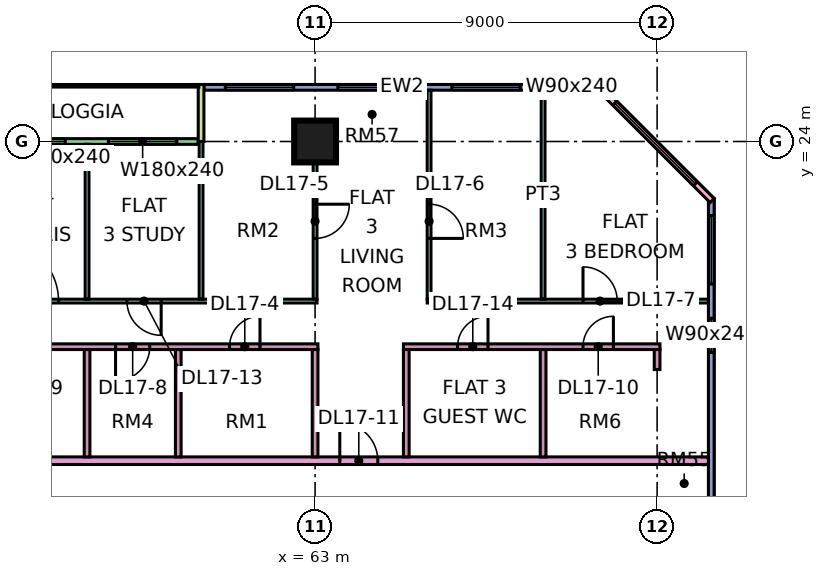
"""IFC4 building model, lengths in metres.
Left out: names, types, materials, properties, quantities, classifications, styles, units other than length and angle.
Written with IfcOpenShell. Run it as: python <this file> out.ifc"""

import sys

from ifc_helpers import new_model, si_unit, direction, frame, frame_2d, origin, origin_2d, place, context, subcontext, project, spatial, rectangle, extrude, element, fill, save


model = new_model("IFC4")
c1 = context("Model", 3, precision=1e-05, world=origin(), true_north=direction((0.0, 1.0)))
c2 = subcontext(c1, "Body", "Model", "MODEL_VIEW")
j1 = project(units=[si_unit("LENGTHUNIT", "METRE"), si_unit("PLANEANGLEUNIT", "RADIAN")], contexts=[c1])
p1 = place(None, origin())
s1 = spatial("IfcSite", under=j1, at=p1, CompositionType="ELEMENT")
p2 = place(p1, origin())
s2 = spatial("IfcBuilding", under=s1, at=p2, CompositionType="ELEMENT")
p3 = place(p2, frame((0.0, 0.0, 78.9)))
s3 = spatial("IfcBuildingStorey", under=s2, at=p3, CompositionType="ELEMENT", Elevation=78.9)
p4 = place(p3, frame((63.0, 24.0, 0.0), z_axis=(0.0, 0.0, 1.0), x_axis=(1.0, 0.0, 0.0)))
e1 = element("IfcColumn", 1, at=p4, inside=s3, PredefinedType="COLUMN", context=c2, shape_type="SweptSolid", body=[
    extrude(rectangle(XDim=1.1, YDim=1.1, at=origin_2d()), origin(), (0.0, 0.0, 1.0), 3.75),
])
p5 = place(p3, frame((70.5, 25.425, 0.0), z_axis=(0.0, 0.0, 1.0), x_axis=(-1.0, 0.0, 0.0)))
e2 = element("IfcWall", 2, at=p5, inside=s3, PredefinedType="SOLIDWALL", context=c2, shape_type="SweptSolid", body=[
    extrude(rectangle(XDim=10.425, YDim=0.15, at=frame_2d((5.212, 0.0))), origin(), (0.0, 0.0, 1.0), 3.35),
])
p6 = place(p5, frame((0.3, 0.0, 0.45)))
e3 = element("IfcOpeningElement", 3, at=p6, cuts=e2, PredefinedType="OPENING", context=c2, shape_type="SweptSolid", body=[
    extrude(rectangle(XDim=0.9, YDim=2.4, at=frame_2d((0.45, 1.2))), frame((0.0, 0.085, 0.0), z_axis=(0.0, -1.0, 0.0), x_axis=(1.0, 0.0, 0.0)), (0.0, 0.0, 1.0), 0.17),
])
p7 = place(p5, frame((2.1, 0.0, 0.45)))
e4 = element("IfcOpeningElement", 4, at=p7, cuts=e2, PredefinedType="OPENING", context=c2, shape_type="SweptSolid", body=[
    extrude(rectangle(XDim=1.8, YDim=2.4, at=frame_2d((0.9, 1.2))), frame((0.0, 0.085, 0.0), z_axis=(0.0, -1.0, 0.0), x_axis=(1.0, 0.0, 0.0)), (0.0, 0.0, 1.0), 0.17),
])
p8 = place(p5, frame((5.1, 0.0, 0.45)))
e5 = element("IfcOpeningElement", 5, at=p8, cuts=e2, PredefinedType="OPENING", context=c2, shape_type="SweptSolid", body=[
    extrude(rectangle(XDim=1.8, YDim=2.4, at=frame_2d((0.9, 1.2))), frame((0.0, 0.085, 0.0), z_axis=(0.0, -1.0, 0.0), x_axis=(1.0, 0.0, 0.0)), (0.0, 0.0, 1.0), 0.17),
])
p9 = place(p5, frame((8.062, 0.0, 0.45)))
e6 = element("IfcOpeningElement", 6, at=p9, cuts=e2, PredefinedType="OPENING", context=c2, shape_type="SweptSolid", body=[
    extrude(rectangle(XDim=1.8, YDim=2.4, at=frame_2d((0.9, 1.2))), frame((0.0, 0.085, 0.0), z_axis=(0.0, -1.0, 0.0), x_axis=(1.0, 0.0, 0.0)), (0.0, 0.0, 1.0), 0.17),
])
p10 = place(p3, frame((59.925, 24.0, 0.0), z_axis=(0.0, 0.0, 1.0), x_axis=(-1.0, 0.0, 0.0)))
e7 = element("IfcWall", 7, at=p10, inside=s3, PredefinedType="SOLIDWALL", context=c2, shape_type="SweptSolid", body=[
    extrude(rectangle(XDim=11.85, YDim=0.15, at=frame_2d((5.925, 0.0))), origin(), (0.0, 0.0, 1.0), 3.35),
])
p11 = place(p10, frame((0.562, 0.0, 0.45)))
e8 = element("IfcOpeningElement", 8, at=p11, cuts=e7, PredefinedType="OPENING", context=c2, shape_type="SweptSolid", body=[
    extrude(rectangle(XDim=1.8, YDim=2.4, at=frame_2d((0.9, 1.2))), frame((0.0, 0.085, 0.0), z_axis=(0.0, -1.0, 0.0), x_axis=(1.0, 0.0, 0.0)), (0.0, 0.0, 1.0), 0.17),
])
p12 = place(p10, frame((3.5, 0.0, 0.45)))
e9 = element("IfcOpeningElement", 9, at=p12, cuts=e7, PredefinedType="OPENING", context=c2, shape_type="SweptSolid", body=[
    extrude(rectangle(XDim=1.2, YDim=2.4, at=frame_2d((0.6, 1.2))), frame((0.0, 0.085, 0.0), z_axis=(0.0, -1.0, 0.0), x_axis=(1.0, 0.0, 0.0)), (0.0, 0.0, 1.0), 0.17),
])
p13 = place(p10, frame((7.113, 0.0, 0.45)))
e10 = element("IfcOpeningElement", 10, at=p13, cuts=e7, PredefinedType="OPENING", context=c2, shape_type="SweptSolid", body=[
    extrude(rectangle(XDim=4.2, YDim=2.4, at=frame_2d((2.1, 1.2))), frame((0.0, 0.085, 0.0), z_axis=(0.0, -1.0, 0.0), x_axis=(1.0, 0.0, 0.0)), (0.0, 0.0, 1.0), 0.17),
])
p14 = place(p3, frame((60.0, 25.5, 0.0), z_axis=(0.0, 0.0, 1.0), x_axis=(0.0, -1.0, 0.0)))
e11 = element("IfcWall", 11, at=p14, inside=s3, PredefinedType="SOLIDWALL", context=c2, shape_type="SweptSolid", body=[
    extrude(rectangle(XDim=1.5, YDim=0.15, at=frame_2d((0.75, 0.0))), origin(), (0.0, 0.0, 1.0), 3.35),
])
p15 = place(p3, frame((73.425, 12.075, 0.0), z_axis=(0.0, 0.0, 1.0), x_axis=(0.0, 1.0, 0.0)))
e12 = element("IfcWall", 12, at=p15, inside=s3, PredefinedType="SOLIDWALL", context=c2, shape_type="SweptSolid", body=[
    extrude(rectangle(XDim=10.425, YDim=0.15, at=frame_2d((5.212, 0.0))), origin(), (0.0, 0.0, 1.0), 3.35),
])
p16 = place(p15, frame((6.375, 0.0, 0.45)))
e13 = element("IfcOpeningElement", 13, at=p16, cuts=e12, PredefinedType="OPENING", context=c2, shape_type="SweptSolid", body=[
    extrude(rectangle(XDim=0.9, YDim=2.4, at=frame_2d((0.45, 1.2))), frame((0.0, 0.085, 0.0), z_axis=(0.0, -1.0, 0.0), x_axis=(1.0, 0.0, 0.0)), (0.0, 0.0, 1.0), 0.17),
])
p17 = place(p15, frame((8.175, 0.0, 0.45)))
e14 = element("IfcOpeningElement", 14, at=p17, cuts=e12, PredefinedType="OPENING", context=c2, shape_type="SweptSolid", body=[
    extrude(rectangle(XDim=1.8, YDim=2.4, at=frame_2d((0.9, 1.2))), frame((0.0, 0.085, 0.0), z_axis=(0.0, -1.0, 0.0), x_axis=(1.0, 0.0, 0.0)), (0.0, 0.0, 1.0), 0.17),
])
p18 = place(p3, frame((73.447, 22.447, 0.0), z_axis=(0.0, 0.0, 1.0), x_axis=(-0.707106781187, 0.707106781187, 0.0)))
e15 = element("IfcWall", 15, at=p18, inside=s3, PredefinedType="SOLIDWALL", context=c2, shape_type="SweptSolid", body=[
    extrude(rectangle(XDim=4.243, YDim=0.15, at=frame_2d((2.121, 0.0))), origin(), (0.0, 0.0, 1.0), 3.35),
])
p19 = place(p18, frame((0.621, 0.0, 0.45)))
e16 = element("IfcOpeningElement", 16, at=p19, cuts=e15, PredefinedType="OPENING", context=c2, shape_type="SweptSolid", body=[
    extrude(rectangle(XDim=3.0, YDim=2.4, at=frame_2d((1.5, 1.2))), frame((0.0, 0.085, 0.0), z_axis=(0.0, -1.0, 0.0), x_axis=(1.0, 0.0, 0.0)), (0.0, 0.0, 1.0), 0.17),
])
p20 = place(p3, frame((51.225, 15.6, 0.0), z_axis=(0.0, 0.0, 1.0), x_axis=(1.0, 0.0, 0.0)))
e17 = element("IfcWall", 17, at=p20, inside=s3, PredefinedType="PARTITIONING", context=c2, shape_type="SweptSolid", body=[
    extrude(rectangle(XDim=22.125, YDim=0.2, at=frame_2d((11.062, 0.0))), origin(), (0.0, 0.0, 1.0), 3.35),
])
p21 = place(p20, frame((12.425, 0.0, 0.0)))
e18 = element("IfcOpeningElement", 18, at=p21, cuts=e17, PredefinedType="OPENING", context=c2, shape_type="SweptSolid", body=[
    extrude(rectangle(XDim=1.0, YDim=2.1, at=frame_2d((0.5, 1.05))), frame((0.0, 0.11, 0.0), z_axis=(0.0, -1.0, 0.0), x_axis=(1.0, 0.0, 0.0)), (0.0, 0.0, 1.0), 0.22),
])
p22 = place(p20, frame((0.875, 0.0, 0.0)))
e19 = element("IfcOpeningElement", 19, at=p22, cuts=e17, PredefinedType="OPENING", context=c2, shape_type="SweptSolid", body=[
    extrude(rectangle(XDim=1.0, YDim=2.1, at=frame_2d((0.5, 1.05))), frame((0.0, 0.11, 0.0), z_axis=(0.0, -1.0, 0.0), x_axis=(1.0, 0.0, 0.0)), (0.0, 0.0, 1.0), 0.22),
])
p23 = place(p3, frame((54.1, 18.6, 0.0), z_axis=(0.0, 0.0, 1.0), x_axis=(1.0, 0.0, 0.0)))
e20 = element("IfcWall", 20, at=p23, inside=s3, PredefinedType="PARTITIONING", context=c2, shape_type="SweptSolid", body=[
    extrude(rectangle(XDim=8.975, YDim=0.15, at=frame_2d((4.487, 0.0))), origin(), (0.0, 0.0, 1.0), 3.35),
])
p24 = place(p23, frame((6.65, 0.0, 0.0)))
e21 = element("IfcOpeningElement", 21, at=p24, cuts=e20, PredefinedType="OPENING", context=c2, shape_type="SweptSolid", body=[
    extrude(rectangle(XDim=0.8, YDim=2.1, at=frame_2d((0.4, 1.05))), frame((0.0, 0.085, 0.0), z_axis=(0.0, -1.0, 0.0), x_axis=(1.0, 0.0, 0.0)), (0.0, 0.0, 1.0), 0.17),
])
p25 = place(p23, frame((3.65, 0.0, 0.0)))
e22 = element("IfcOpeningElement", 22, at=p25, cuts=e20, PredefinedType="OPENING", context=c2, shape_type="SweptSolid", body=[
    extrude(rectangle(XDim=0.9, YDim=2.1, at=frame_2d((0.45, 1.05))), frame((0.0, 0.085, 0.0), z_axis=(0.0, -1.0, 0.0), x_axis=(1.0, 0.0, 0.0)), (0.0, 0.0, 1.0), 0.17),
])
p26 = place(p23, frame((0.95, 0.0, 0.0)))
e23 = element("IfcOpeningElement", 23, at=p26, cuts=e20, PredefinedType="OPENING", context=c2, shape_type="SweptSolid", body=[
    extrude(rectangle(XDim=0.8, YDim=2.1, at=frame_2d((0.4, 1.05))), frame((0.0, 0.085, 0.0), z_axis=(0.0, -1.0, 0.0), x_axis=(1.0, 0.0, 0.0)), (0.0, 0.0, 1.0), 0.17),
])
p27 = place(p3, frame((54.1, 19.8, 0.0), z_axis=(0.0, 0.0, 1.0), x_axis=(1.0, 0.0, 0.0)))
e24 = element("IfcWall", 24, at=p27, inside=s3, PredefinedType="PARTITIONING", context=c2, shape_type="SweptSolid", body=[
    extrude(rectangle(XDim=8.95, YDim=0.1, at=frame_2d((4.475, 0.0))), origin(), (0.0, 0.0, 1.0), 3.35),
])
p28 = place(p27, frame((0.55, 0.0, 0.0)))
e25 = element("IfcOpeningElement", 25, at=p28, cuts=e24, PredefinedType="OPENING", context=c2, shape_type="SweptSolid", body=[
    extrude(rectangle(XDim=1.6, YDim=2.1, at=frame_2d((0.8, 1.05))), frame((0.0, 0.06, 0.0), z_axis=(0.0, -1.0, 0.0), x_axis=(1.0, 0.0, 0.0)), (0.0, 0.0, 1.0), 0.12),
])
p29 = place(p27, frame((3.95, 0.0, 0.0)))
e26 = element("IfcOpeningElement", 26, at=p29, cuts=e24, PredefinedType="OPENING", context=c2, shape_type="SweptSolid", body=[
    extrude(rectangle(XDim=0.9, YDim=2.1, at=frame_2d((0.45, 1.05))), frame((0.0, 0.06, 0.0), z_axis=(0.0, -1.0, 0.0), x_axis=(1.0, 0.0, 0.0)), (0.0, 0.0, 1.0), 0.12),
])
p30 = place(p3, frame((57.0, 15.7, 0.0), z_axis=(0.0, 0.0, 1.0), x_axis=(0.0, 1.0, 0.0)))
e27 = element("IfcWall", 27, at=p30, inside=s3, PredefinedType="PARTITIONING", context=c2, shape_type="SweptSolid", body=[
    extrude(rectangle(XDim=2.825, YDim=0.15, at=frame_2d((1.413, 0.0))), origin(), (0.0, 0.0, 1.0), 3.35),
])
p31 = place(p3, frame((57.0, 19.85, 0.0), z_axis=(0.0, 0.0, 1.0), x_axis=(0.0, 1.0, 0.0)))
e28 = element("IfcWall", 28, at=p31, inside=s3, PredefinedType="PARTITIONING", context=c2, shape_type="SweptSolid", body=[
    extrude(rectangle(XDim=4.076, YDim=0.1, at=frame_2d((2.038, 0.0))), origin(), (0.0, 0.0, 1.0), 3.35),
])
p32 = place(p3, frame((59.4, 15.7, 0.0), z_axis=(0.0, 0.0, 1.0), x_axis=(0.0, 1.0, 0.0)))
e29 = element("IfcWall", 29, at=p32, inside=s3, PredefinedType="PARTITIONING", context=c2, shape_type="SweptSolid", body=[
    extrude(rectangle(XDim=2.825, YDim=0.15, at=frame_2d((1.413, 0.0))), origin(), (0.0, 0.0, 1.0), 3.35),
])
p33 = place(p3, frame((60.0, 19.85, 0.0), z_axis=(0.0, 0.0, 1.0), x_axis=(0.0, 1.0, 0.0)))
e30 = element("IfcWall", 30, at=p33, inside=s3, PredefinedType="PARTITIONING", context=c2, shape_type="SweptSolid", body=[
    extrude(rectangle(XDim=4.15, YDim=0.1, at=frame_2d((2.075, 0.0))), origin(), (0.0, 0.0, 1.0), 3.35),
])
p34 = place(p3, frame((63.0, 15.7, 0.0), z_axis=(0.0, 0.0, 1.0), x_axis=(0.0, 1.0, 0.0)))
e31 = element("IfcWall", 31, at=p34, inside=s3, PredefinedType="PARTITIONING", context=c2, shape_type="SweptSolid", body=[
    extrude(rectangle(XDim=2.825, YDim=0.15, at=frame_2d((1.413, 0.0))), origin(), (0.0, 0.0, 1.0), 3.35),
])
p35 = place(p3, frame((63.0, 19.85, 0.0), z_axis=(0.0, 0.0, 1.0), x_axis=(0.0, 1.0, 0.0)))
e32 = element("IfcWall", 32, at=p35, inside=s3, PredefinedType="PARTITIONING", context=c2, shape_type="SweptSolid", body=[
    extrude(rectangle(XDim=4.15, YDim=0.1, at=frame_2d((2.075, 0.0))), origin(), (0.0, 0.0, 1.0), 3.35),
])
p36 = place(p35, frame((1.6, 0.0, 0.0)))
e33 = element("IfcOpeningElement", 33, at=p36, cuts=e32, PredefinedType="OPENING", context=c2, shape_type="SweptSolid", body=[
    extrude(rectangle(XDim=0.9, YDim=2.1, at=frame_2d((0.45, 1.05))), frame((0.0, 0.06, 0.0), z_axis=(0.0, -1.0, 0.0), x_axis=(1.0, 0.0, 0.0)), (0.0, 0.0, 1.0), 0.12),
])
p37 = place(p3, frame((65.325, 18.6, 0.0), z_axis=(0.0, 0.0, 1.0), x_axis=(1.0, 0.0, 0.0)))
e34 = element("IfcWall", 34, at=p37, inside=s3, PredefinedType="PARTITIONING", context=c2, shape_type="SweptSolid", body=[
    extrude(rectangle(XDim=6.75, YDim=0.15, at=frame_2d((3.375, 0.0))), origin(), (0.0, 0.0, 1.0), 3.35),
])
p38 = place(p37, frame((4.725, 0.0, 0.0)))
e35 = element("IfcOpeningElement", 35, at=p38, cuts=e34, PredefinedType="OPENING", context=c2, shape_type="SweptSolid", body=[
    extrude(rectangle(XDim=0.8, YDim=2.1, at=frame_2d((0.4, 1.05))), frame((0.0, 0.085, 0.0), z_axis=(0.0, -1.0, 0.0), x_axis=(1.0, 0.0, 0.0)), (0.0, 0.0, 1.0), 0.17),
])
p39 = place(p37, frame((1.425, 0.0, 0.0)))
e36 = element("IfcOpeningElement", 36, at=p39, cuts=e34, PredefinedType="OPENING", context=c2, shape_type="SweptSolid", body=[
    extrude(rectangle(XDim=0.8, YDim=2.1, at=frame_2d((0.4, 1.05))), frame((0.0, 0.085, 0.0), z_axis=(0.0, -1.0, 0.0), x_axis=(1.0, 0.0, 0.0)), (0.0, 0.0, 1.0), 0.17),
])
p40 = place(p3, frame((65.4, 15.7, 0.0), z_axis=(0.0, 0.0, 1.0), x_axis=(0.0, 1.0, 0.0)))
e37 = element("IfcWall", 37, at=p40, inside=s3, PredefinedType="PARTITIONING", context=c2, shape_type="SweptSolid", body=[
    extrude(rectangle(XDim=2.825, YDim=0.15, at=frame_2d((1.413, 0.0))), origin(), (0.0, 0.0, 1.0), 3.35),
])
p41 = place(p3, frame((65.95, 19.8, 0.0), z_axis=(0.0, 0.0, 1.0), x_axis=(1.0, 0.0, 0.0)))
e38 = element("IfcWall", 38, at=p41, inside=s3, PredefinedType="PARTITIONING", context=c2, shape_type="SweptSolid", body=[
    extrude(rectangle(XDim=7.401, YDim=0.1, at=frame_2d((3.701, 0.0))), origin(), (0.0, 0.0, 1.0), 3.35),
])
p42 = place(p41, frame((4.1, 0.0, 0.0)))
e39 = element("IfcOpeningElement", 39, at=p42, cuts=e38, PredefinedType="OPENING", context=c2, shape_type="SweptSolid", body=[
    extrude(rectangle(XDim=0.9, YDim=2.1, at=frame_2d((0.45, 1.05))), frame((0.0, 0.06, 0.0), z_axis=(0.0, -1.0, 0.0), x_axis=(1.0, 0.0, 0.0)), (0.0, 0.0, 1.0), 0.12),
])
p43 = place(p3, frame((66.0, 19.85, 0.0), z_axis=(0.0, 0.0, 1.0), x_axis=(0.0, 1.0, 0.0)))
e40 = element("IfcWall", 40, at=p43, inside=s3, PredefinedType="PARTITIONING", context=c2, shape_type="SweptSolid", body=[
    extrude(rectangle(XDim=5.5, YDim=0.1, at=frame_2d((2.75, 0.0))), origin(), (0.0, 0.0, 1.0), 3.35),
])
p44 = place(p43, frame((1.6, 0.0, 0.0)))
e41 = element("IfcOpeningElement", 41, at=p44, cuts=e40, PredefinedType="OPENING", context=c2, shape_type="SweptSolid", body=[
    extrude(rectangle(XDim=0.9, YDim=2.1, at=frame_2d((0.45, 1.05))), frame((0.0, 0.06, 0.0), z_axis=(0.0, -1.0, 0.0), x_axis=(1.0, 0.0, 0.0)), (0.0, 0.0, 1.0), 0.12),
])
p45 = place(p3, frame((69.0, 15.7, 0.0), z_axis=(0.0, 0.0, 1.0), x_axis=(0.0, 1.0, 0.0)))
e42 = element("IfcWall", 42, at=p45, inside=s3, PredefinedType="PARTITIONING", context=c2, shape_type="SweptSolid", body=[
    extrude(rectangle(XDim=2.825, YDim=0.15, at=frame_2d((1.413, 0.0))), origin(), (0.0, 0.0, 1.0), 3.35),
])
p46 = place(p3, frame((69.0, 19.85, 0.0), z_axis=(0.0, 0.0, 1.0), x_axis=(0.0, 1.0, 0.0)))
e43 = element("IfcWall", 43, at=p46, inside=s3, PredefinedType="PARTITIONING", context=c2, shape_type="SweptSolid", body=[
    extrude(rectangle(XDim=5.501, YDim=0.1, at=frame_2d((2.75, 0.0))), origin(), (0.0, 0.0, 1.0), 3.35),
])
p47 = place(p3, frame((72.0, 18.0, 0.0), z_axis=(0.0, 0.0, 1.0), x_axis=(0.0, 1.0, 0.0)))
e44 = element("IfcWall", 44, at=p47, inside=s3, PredefinedType="PARTITIONING", context=c2, shape_type="SweptSolid", body=[
    extrude(rectangle(XDim=0.525, YDim=0.15, at=frame_2d((0.262, 0.0))), origin(), (0.0, 0.0, 1.0), 3.35),
])
p48 = place(p6, origin())
e45 = element("IfcWindow", 45, at=p48, inside=s3, PartitioningType="SINGLE_PANEL", PredefinedType="WINDOW", context=c2, shape_type="SweptSolid", body=[
    extrude(rectangle(XDim=0.9, YDim=2.4, at=frame_2d((0.45, 1.2))), frame((0.0, 0.03, 0.0), z_axis=(0.0, -1.0, 0.0), x_axis=(1.0, 0.0, 0.0)), (0.0, 0.0, 1.0), 0.06),
])
fill(e3, e45)
p49 = place(p7, origin())
e46 = element("IfcWindow", 46, at=p49, inside=s3, PartitioningType="SINGLE_PANEL", PredefinedType="WINDOW", context=c2, shape_type="SweptSolid", body=[
    extrude(rectangle(XDim=1.8, YDim=2.4, at=frame_2d((0.9, 1.2))), frame((0.0, 0.03, 0.0), z_axis=(0.0, -1.0, 0.0), x_axis=(1.0, 0.0, 0.0)), (0.0, 0.0, 1.0), 0.06),
])
fill(e4, e46)
p50 = place(p8, origin())
e47 = element("IfcWindow", 47, at=p50, inside=s3, PartitioningType="SINGLE_PANEL", PredefinedType="WINDOW", context=c2, shape_type="SweptSolid", body=[
    extrude(rectangle(XDim=1.8, YDim=2.4, at=frame_2d((0.9, 1.2))), frame((0.0, 0.03, 0.0), z_axis=(0.0, -1.0, 0.0), x_axis=(1.0, 0.0, 0.0)), (0.0, 0.0, 1.0), 0.06),
])
fill(e5, e47)
p51 = place(p9, origin())
e48 = element("IfcWindow", 48, at=p51, inside=s3, PartitioningType="SINGLE_PANEL", PredefinedType="WINDOW", context=c2, shape_type="SweptSolid", body=[
    extrude(rectangle(XDim=1.8, YDim=2.4, at=frame_2d((0.9, 1.2))), frame((0.0, 0.03, 0.0), z_axis=(0.0, -1.0, 0.0), x_axis=(1.0, 0.0, 0.0)), (0.0, 0.0, 1.0), 0.06),
])
fill(e6, e48)
p52 = place(p11, origin())
e49 = element("IfcWindow", 49, at=p52, inside=s3, PartitioningType="SINGLE_PANEL", PredefinedType="WINDOW", context=c2, shape_type="SweptSolid", body=[
    extrude(rectangle(XDim=1.8, YDim=2.4, at=frame_2d((0.9, 1.2))), frame((0.0, 0.03, 0.0), z_axis=(0.0, -1.0, 0.0), x_axis=(1.0, 0.0, 0.0)), (0.0, 0.0, 1.0), 0.06),
])
fill(e8, e49)
p53 = place(p12, origin())
e50 = element("IfcWindow", 50, at=p53, inside=s3, PartitioningType="SINGLE_PANEL", PredefinedType="WINDOW", context=c2, shape_type="SweptSolid", body=[
    extrude(rectangle(XDim=1.2, YDim=2.4, at=frame_2d((0.6, 1.2))), frame((0.0, 0.03, 0.0), z_axis=(0.0, -1.0, 0.0), x_axis=(1.0, 0.0, 0.0)), (0.0, 0.0, 1.0), 0.06),
])
fill(e9, e50)
p54 = place(p16, origin())
e51 = element("IfcWindow", 51, at=p54, inside=s3, PartitioningType="SINGLE_PANEL", PredefinedType="WINDOW", context=c2, shape_type="SweptSolid", body=[
    extrude(rectangle(XDim=0.9, YDim=2.4, at=frame_2d((0.45, 1.2))), frame((0.0, 0.03, 0.0), z_axis=(0.0, -1.0, 0.0), x_axis=(1.0, 0.0, 0.0)), (0.0, 0.0, 1.0), 0.06),
])
fill(e13, e51)
p55 = place(p17, origin())
e52 = element("IfcWindow", 52, at=p55, inside=s3, PartitioningType="SINGLE_PANEL", PredefinedType="WINDOW", context=c2, shape_type="SweptSolid", body=[
    extrude(rectangle(XDim=1.8, YDim=2.4, at=frame_2d((0.9, 1.2))), frame((0.0, 0.03, 0.0), z_axis=(0.0, -1.0, 0.0), x_axis=(1.0, 0.0, 0.0)), (0.0, 0.0, 1.0), 0.06),
])
fill(e14, e52)
p56 = place(p19, origin())
e53 = element("IfcWindow", 53, at=p56, inside=s3, PartitioningType="SINGLE_PANEL", PredefinedType="WINDOW", context=c2, shape_type="SweptSolid", body=[
    extrude(rectangle(XDim=3.0, YDim=2.4, at=frame_2d((1.5, 1.2))), frame((0.0, 0.03, 0.0), z_axis=(0.0, -1.0, 0.0), x_axis=(1.0, 0.0, 0.0)), (0.0, 0.0, 1.0), 0.06),
])
fill(e16, e53)
p57 = place(p24, frame((0.8, 0.0, 0.0), z_axis=(0.0, 0.0, 1.0), x_axis=(-1.0, 0.0, 0.0)))
e54 = element("IfcDoor", 54, at=p57, inside=s3, OperationType="SINGLE_SWING_RIGHT", PredefinedType="DOOR", context=c2, shape_type="SweptSolid", body=[
    extrude(rectangle(XDim=0.8, YDim=2.1, at=frame_2d((0.4, 1.05))), frame((0.0, 0.025, 0.0), z_axis=(0.0, -1.0, 0.0), x_axis=(1.0, 0.0, 0.0)), (0.0, 0.0, 1.0), 0.05),
])
fill(e21, e54)
p58 = place(p36, origin())
e55 = element("IfcDoor", 55, at=p58, inside=s3, OperationType="SINGLE_SWING_RIGHT", PredefinedType="DOOR", context=c2, shape_type="SweptSolid", body=[
    extrude(rectangle(XDim=0.9, YDim=2.1, at=frame_2d((0.45, 1.05))), frame((0.0, 0.025, 0.0), z_axis=(0.0, -1.0, 0.0), x_axis=(1.0, 0.0, 0.0)), (0.0, 0.0, 1.0), 0.05),
])
fill(e33, e55)
p59 = place(p44, frame((0.9, 0.0, 0.0), z_axis=(0.0, 0.0, 1.0), x_axis=(-1.0, 0.0, 0.0)))
e56 = element("IfcDoor", 56, at=p59, inside=s3, OperationType="SINGLE_SWING_LEFT", PredefinedType="DOOR", context=c2, shape_type="SweptSolid", body=[
    extrude(rectangle(XDim=0.9, YDim=2.1, at=frame_2d((0.45, 1.05))), frame((0.0, 0.025, 0.0), z_axis=(0.0, -1.0, 0.0), x_axis=(1.0, 0.0, 0.0)), (0.0, 0.0, 1.0), 0.05),
])
fill(e41, e56)
p60 = place(p42, origin())
e57 = element("IfcDoor", 57, at=p60, inside=s3, OperationType="SINGLE_SWING_LEFT", PredefinedType="DOOR", context=c2, shape_type="SweptSolid", body=[
    extrude(rectangle(XDim=0.9, YDim=2.1, at=frame_2d((0.45, 1.05))), frame((0.0, 0.025, 0.0), z_axis=(0.0, -1.0, 0.0), x_axis=(1.0, 0.0, 0.0)), (0.0, 0.0, 1.0), 0.05),
])
fill(e39, e57)
p61 = place(p25, frame((0.9, 0.0, 0.0), z_axis=(0.0, 0.0, 1.0), x_axis=(-1.0, 0.0, 0.0)))
e58 = element("IfcDoor", 58, at=p61, inside=s3, OperationType="SINGLE_SWING_LEFT", PredefinedType="DOOR", context=c2, shape_type="SweptSolid", body=[
    extrude(rectangle(XDim=0.9, YDim=2.1, at=frame_2d((0.45, 1.05))), frame((0.0, 0.025, 0.0), z_axis=(0.0, -1.0, 0.0), x_axis=(1.0, 0.0, 0.0)), (0.0, 0.0, 1.0), 0.05),
])
fill(e22, e58)
p62 = place(p38, frame((0.8, 0.0, 0.0), z_axis=(0.0, 0.0, 1.0), x_axis=(-1.0, 0.0, 0.0)))
e59 = element("IfcDoor", 59, at=p62, inside=s3, OperationType="SINGLE_SWING_RIGHT", PredefinedType="DOOR", context=c2, shape_type="SweptSolid", body=[
    extrude(rectangle(XDim=0.8, YDim=2.1, at=frame_2d((0.4, 1.05))), frame((0.0, 0.025, 0.0), z_axis=(0.0, -1.0, 0.0), x_axis=(1.0, 0.0, 0.0)), (0.0, 0.0, 1.0), 0.05),
])
fill(e35, e59)
p63 = place(p21, origin())
e60 = element("IfcDoor", 60, at=p63, inside=s3, OperationType="SINGLE_SWING_LEFT", PredefinedType="DOOR", context=c2, shape_type="SweptSolid", body=[
    extrude(rectangle(XDim=1.0, YDim=2.1, at=frame_2d((0.5, 1.05))), frame((0.0, 0.025, 0.0), z_axis=(0.0, -1.0, 0.0), x_axis=(1.0, 0.0, 0.0)), (0.0, 0.0, 1.0), 0.05),
])
fill(e18, e60)
p64 = place(p28, origin())
e61 = element("IfcDoor", 61, at=p64, inside=s3, OperationType="DOUBLE_DOOR_SINGLE_SWING", PredefinedType="DOOR", context=c2, shape_type="SweptSolid", body=[
    extrude(rectangle(XDim=1.6, YDim=2.1, at=frame_2d((0.8, 1.05))), frame((0.0, 0.025, 0.0), z_axis=(0.0, -1.0, 0.0), x_axis=(1.0, 0.0, 0.0)), (0.0, 0.0, 1.0), 0.05),
])
fill(e25, e61)
p65 = place(p29, origin())
e62 = element("IfcDoor", 62, at=p65, inside=s3, OperationType="SINGLE_SWING_RIGHT", PredefinedType="DOOR", context=c2, shape_type="SweptSolid", body=[
    extrude(rectangle(XDim=0.9, YDim=2.1, at=frame_2d((0.45, 1.05))), frame((0.0, 0.025, 0.0), z_axis=(0.0, -1.0, 0.0), x_axis=(1.0, 0.0, 0.0)), (0.0, 0.0, 1.0), 0.05),
])
fill(e26, e62)
p66 = place(p39, frame((0.8, 0.0, 0.0), z_axis=(0.0, 0.0, 1.0), x_axis=(-1.0, 0.0, 0.0)))
e63 = element("IfcDoor", 63, at=p66, inside=s3, OperationType="SINGLE_SWING_RIGHT", PredefinedType="DOOR", context=c2, shape_type="SweptSolid", body=[
    extrude(rectangle(XDim=0.8, YDim=2.1, at=frame_2d((0.4, 1.05))), frame((0.0, 0.025, 0.0), z_axis=(0.0, -1.0, 0.0), x_axis=(1.0, 0.0, 0.0)), (0.0, 0.0, 1.0), 0.05),
])
fill(e36, e63)
save(model, sys.argv[1])
